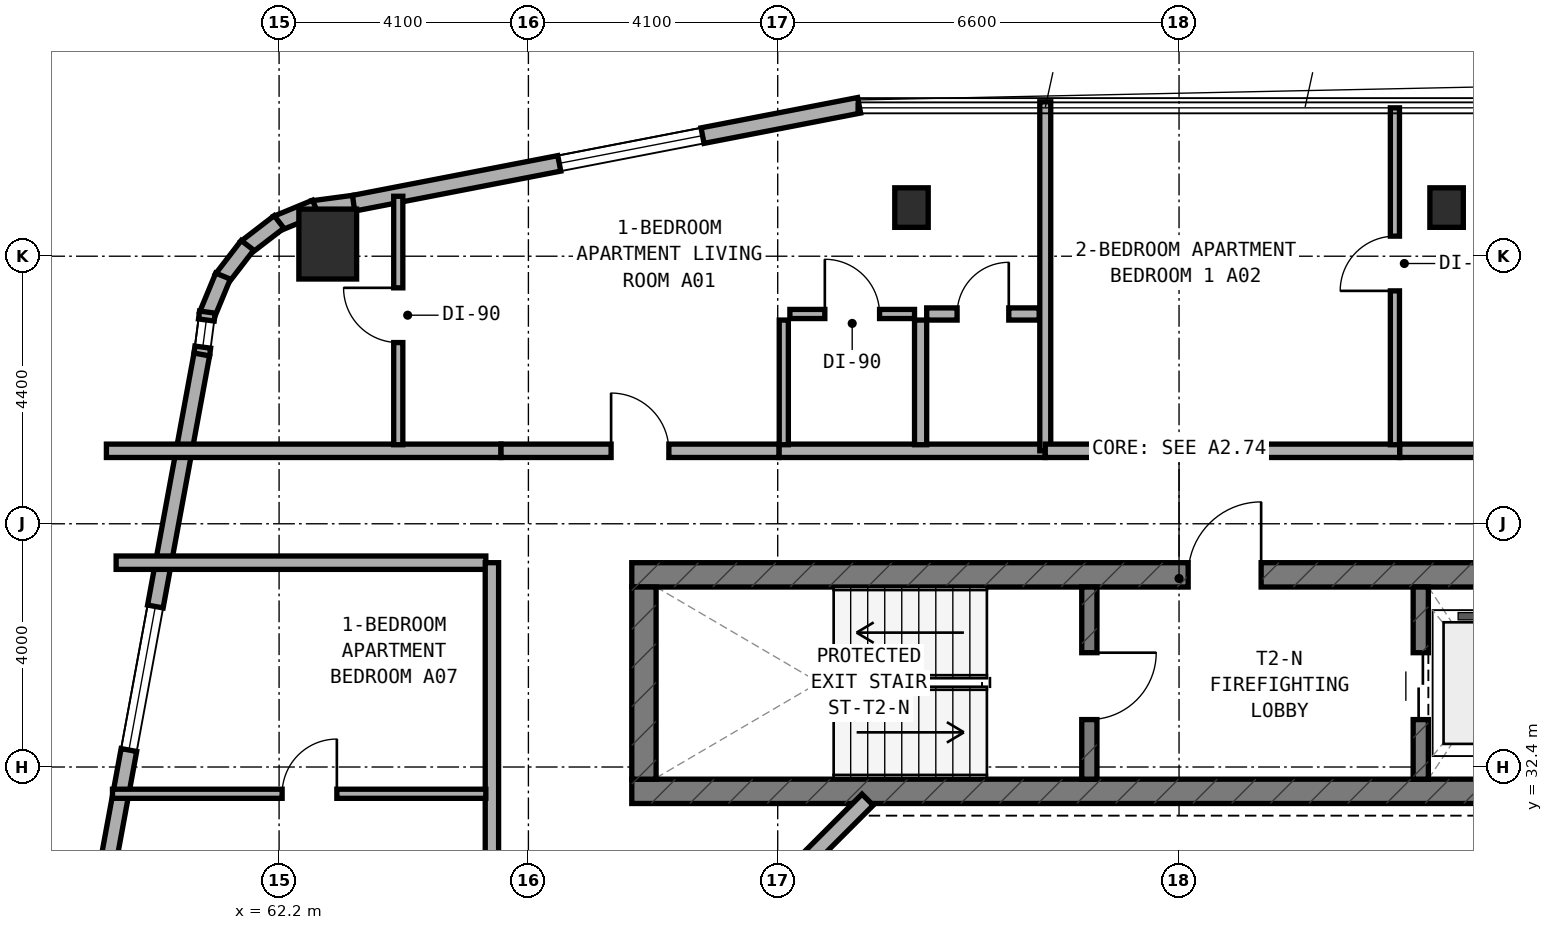
"""IFC4 building model, lengths in metres.
Left out: names, types, materials, properties, quantities, classifications, styles, units other than length and angle.
Written with IfcOpenShell. Run it as: python <this file> out.ifc"""

import sys

from ifc_helpers import new_model, si_unit, direction, frame, frame_2d, origin, origin_2d, place, context, subcontext, project, spatial, rectangle, extrude, element, fill, save


model = new_model("IFC4")
c1 = context("Model", 3, precision=1e-05, world=origin(), true_north=direction((0.0, 1.0)))
c2 = subcontext(c1, "Body", "Model", "MODEL_VIEW")
j1 = project(units=[si_unit("LENGTHUNIT", "METRE"), si_unit("PLANEANGLEUNIT", "RADIAN")], contexts=[c1])
p1 = place(None, origin())
s1 = spatial("IfcSite", under=j1, at=p1, CompositionType="ELEMENT")
p2 = place(p1, origin())
s2 = spatial("IfcBuilding", under=s1, at=p2, CompositionType="ELEMENT")
p3 = place(p2, frame((0.0, 0.0, 109.0)))
s3 = spatial("IfcBuildingStorey", under=s2, at=p3, CompositionType="ELEMENT", Elevation=109.0)
p4 = place(p3, frame((68.0, 32.0, 0.0), z_axis=(0.0, 0.0, 1.0), x_axis=(1.0, 0.0, 0.0)))
e1 = element("IfcWall", 1, at=p4, inside=s3, PredefinedType="SHEAR", context=c2, shape_type="SweptSolid", body=[
    extrude(rectangle(XDim=18.2, YDim=0.4, at=frame_2d((9.1, 0.0))), origin(), (0.0, 0.0, 1.0), 3.5),
])
p5 = place(p3, frame((68.0, 35.56, 0.0), z_axis=(0.0, 0.0, 1.0), x_axis=(1.0, 0.0, 0.0)))
e2 = element("IfcWall", 2, at=p5, inside=s3, PredefinedType="SHEAR", context=c2, shape_type="SweptSolid", body=[
    extrude(rectangle(XDim=18.2, YDim=0.4, at=frame_2d((9.1, 0.0))), origin(), (0.0, 0.0, 1.0), 3.5),
])
p6 = place(p5, frame((9.15, 0.0, 0.0)))
e3 = element("IfcOpeningElement", 3, at=p6, cuts=e2, PredefinedType="OPENING", context=c2, shape_type="SweptSolid", body=[
    extrude(rectangle(XDim=1.2, YDim=2.15, at=frame_2d((0.6, 1.075))), frame((0.0, 0.21, 0.0), z_axis=(0.0, -1.0, 0.0), x_axis=(1.0, 0.0, 0.0)), (0.0, 0.0, 1.0), 0.42),
])
p7 = place(p5, frame((16.75, 0.0, 0.0)))
e4 = element("IfcOpeningElement", 4, at=p7, cuts=e2, PredefinedType="OPENING", context=c2, shape_type="SweptSolid", body=[
    extrude(rectangle(XDim=0.85, YDim=2.1, at=frame_2d((0.425, 1.05))), frame((0.0, 0.21, 0.0), z_axis=(0.0, -1.0, 0.0), x_axis=(1.0, 0.0, 0.0)), (0.0, 0.0, 1.0), 0.42),
])
p8 = place(p3, frame((68.2, 32.2, 0.0), z_axis=(0.0, 0.0, 1.0), x_axis=(0.0, 1.0, 0.0)))
e5 = element("IfcWall", 5, at=p8, inside=s3, PredefinedType="SHEAR", context=c2, shape_type="SweptSolid", body=[
    extrude(rectangle(XDim=3.16, YDim=0.4, at=frame_2d((1.58, 0.0))), origin(), (0.0, 0.0, 1.0), 3.5),
])
p9 = place(p3, frame((75.525, 32.2, 0.0), z_axis=(0.0, 0.0, 1.0), x_axis=(0.0, 1.0, 0.0)))
e6 = element("IfcWall", 6, at=p9, inside=s3, PredefinedType="STANDARD", context=c2, shape_type="SweptSolid", body=[
    extrude(rectangle(XDim=3.16, YDim=0.25, at=frame_2d((1.58, 0.0))), origin(), (0.0, 0.0, 1.0), 3.25),
])
p10 = place(p9, frame((0.98, 0.0, 0.0)))
e7 = element("IfcOpeningElement", 7, at=p10, cuts=e6, PredefinedType="OPENING", context=c2, shape_type="SweptSolid", body=[
    extrude(rectangle(XDim=1.1, YDim=2.15, at=frame_2d((0.55, 1.075))), frame((0.0, 0.135, 0.0), z_axis=(0.0, -1.0, 0.0), x_axis=(1.0, 0.0, 0.0)), (0.0, 0.0, 1.0), 0.27),
])
p11 = place(p3, frame((80.975, 32.2, 0.0), z_axis=(0.0, 0.0, 1.0), x_axis=(0.0, 1.0, 0.0)))
e8 = element("IfcWall", 8, at=p11, inside=s3, PredefinedType="STANDARD", context=c2, shape_type="SweptSolid", body=[
    extrude(rectangle(XDim=3.16, YDim=0.25, at=frame_2d((1.58, 0.0))), origin(), (0.0, 0.0, 1.0), 3.25),
])
p12 = place(p11, frame((0.98, 0.0, 0.0)))
e9 = element("IfcOpeningElement", 9, at=p12, cuts=e8, PredefinedType="OPENING", context=c2, shape_type="SweptSolid", body=[
    extrude(rectangle(XDim=1.1, YDim=2.15, at=frame_2d((0.55, 1.075))), frame((0.0, 0.135, 0.0), z_axis=(0.0, -1.0, 0.0), x_axis=(1.0, 0.0, 0.0)), (0.0, 0.0, 1.0), 0.27),
])
for number, where, z_axis, x_axis in (
    (10, (72.6, 41.6, 0.0), (0.0, 0.0, 1.0), (1.0, 0.0, 0.0)),
    (11, (81.4, 41.6, 0.0), (0.0, 0.0, 1.0), (1.0, 0.0, 0.0)),
):
    element("IfcColumn", number, at=place(p3, frame(where, z_axis=z_axis, x_axis=x_axis)), inside=s3, PredefinedType="COLUMN", context=c2, shape_type="SweptSolid", body=[
        extrude(rectangle(XDim=0.55, YDim=0.65, at=origin_2d()), origin(), (0.0, 0.0, 1.0), 3.5),
    ])
p13 = place(p3, frame((63.0, 41.0, 0.0), z_axis=(0.0, 0.0, 1.0), x_axis=(1.0, 0.0, 0.0)))
e12 = element("IfcColumn", 12, at=p13, inside=s3, PredefinedType="COLUMN", context=c2, shape_type="SweptSolid", body=[
    extrude(rectangle(XDim=0.95, YDim=1.15, at=origin_2d()), origin(), (0.0, 0.0, 1.0), 3.5),
])
p14 = place(p3, frame((71.739, 43.282, 0.0), z_axis=(0.0, 0.0, 1.0), x_axis=(-0.981750199588, -0.190175039396, 0.0)))
e13 = element("IfcWall", 13, at=p14, inside=s3, PredefinedType="STANDARD", context=c2, shape_type="SweptSolid", body=[
    extrude(rectangle(XDim=8.477, YDim=0.26, at=frame_2d((4.238, 0.0))), origin(), (0.0, 0.0, 1.0), 3.25),
])
p15 = place(p14, frame((2.623, 0.0, 0.8)))
e14 = element("IfcOpeningElement", 14, at=p15, cuts=e13, PredefinedType="OPENING", context=c2, shape_type="SweptSolid", body=[
    extrude(rectangle(XDim=2.4, YDim=1.6, at=frame_2d((1.2, 0.8))), frame((0.0, 0.14, 0.0), z_axis=(0.0, -1.0, 0.0), x_axis=(1.0, 0.0, 0.0)), (0.0, 0.0, 1.0), 0.28),
])
p16 = place(p3, frame((63.425, 41.672, 0.0), z_axis=(0.0, 0.0, 1.0), x_axis=(-0.991300187529, -0.13162043232, 0.0)))
e15 = element("IfcWall", 15, at=p16, inside=s3, PredefinedType="STANDARD", context=c2, shape_type="SweptSolid", body=[
    extrude(rectangle(XDim=0.677, YDim=0.26, at=frame_2d((0.338, 0.0))), origin(), (0.0, 0.0, 1.0), 3.25),
])
for number, where, z_axis, x_axis in (
    (16, (62.8, 41.601, 0.0), (0.0, 0.0, 1.0), (-0.924, -0.382, 0.0)),
    (17, (62.199, 41.364, 0.0), (0.0, 0.0, 1.0), (-0.793, -0.61, 0.0)),
    (18, (61.68, 40.979, 0.0), (0.0, 0.0, 1.0), (-0.609, -0.793, 0.0)),
):
    element("IfcWall", number, at=place(p3, frame(where, z_axis=z_axis, x_axis=x_axis)), inside=s3, PredefinedType="STANDARD", context=c2, shape_type="SweptSolid", body=[
        extrude(rectangle(XDim=0.694, YDim=0.26, at=frame_2d((0.347, 0.0))), origin(), (0.0, 0.0, 1.0), 3.25),
    ])
p17 = place(p3, frame((61.278, 40.473, 0.0), z_axis=(0.0, 0.0, 1.0), x_axis=(-0.382289608286, -0.924042561464, 0.0)))
e19 = element("IfcWall", 19, at=p17, inside=s3, PredefinedType="STANDARD", context=c2, shape_type="SweptSolid", body=[
    extrude(rectangle(XDim=0.694, YDim=0.26, at=frame_2d((0.347, 0.0))), origin(), (0.0, 0.0, 1.0), 3.25),
])
p18 = place(p3, frame((61.021, 39.881, 0.0), z_axis=(0.0, 0.0, 1.0), x_axis=(-0.130614135366, -0.991433279471, 0.0)))
e20 = element("IfcWall", 20, at=p18, inside=s3, PredefinedType="STANDARD", context=c2, shape_type="SweptSolid", body=[
    extrude(rectangle(XDim=0.712, YDim=0.26, at=frame_2d((0.356, 0.0))), origin(), (0.0, 0.0, 1.0), 3.25),
])
p19 = place(p18, frame((0.131, 0.0, 0.85)))
e21 = element("IfcOpeningElement", 21, at=p19, cuts=e20, PredefinedType="OPENING", context=c2, shape_type="SweptSolid", body=[
    extrude(rectangle(XDim=0.45, YDim=1.5, at=frame_2d((0.225, 0.75))), frame((0.0, 0.14, 0.0), z_axis=(0.0, -1.0, 0.0), x_axis=(1.0, 0.0, 0.0)), (0.0, 0.0, 1.0), 0.28),
])
p20 = place(p3, frame((60.929, 39.184, 0.0), z_axis=(0.0, 0.0, 1.0), x_axis=(-0.181209963057, -0.983444431215, 0.0)))
e22 = element("IfcWall", 22, at=p20, inside=s3, PredefinedType="STANDARD", context=c2, shape_type="SweptSolid", body=[
    extrude(rectangle(XDim=8.889, YDim=0.26, at=frame_2d((4.445, 0.0))), origin(), (0.0, 0.0, 1.0), 3.25),
])
p21 = place(p20, frame((4.214, 0.0, 0.8)))
e23 = element("IfcOpeningElement", 23, at=p21, cuts=e22, PredefinedType="OPENING", context=c2, shape_type="SweptSolid", body=[
    extrude(rectangle(XDim=2.4, YDim=1.6, at=frame_2d((1.2, 0.8))), frame((0.0, 0.14, 0.0), z_axis=(0.0, -1.0, 0.0), x_axis=(1.0, 0.0, 0.0)), (0.0, 0.0, 1.0), 0.28),
])
p22 = place(p3, frame((71.878, 31.862, 0.0), z_axis=(0.0, 0.0, 1.0), x_axis=(-0.707106781187, -0.707106781187, 0.0)))
e24 = element("IfcWall", 24, at=p22, inside=s3, PredefinedType="STANDARD", context=c2, shape_type="SweptSolid", body=[
    extrude(rectangle(XDim=2.311, YDim=0.26, at=frame_2d((1.155, 0.0))), origin(), (0.0, 0.0, 1.0), 3.25),
])
p23 = place(p3, frame((59.36, 37.6, 0.0), z_axis=(0.0, 0.0, 1.0), x_axis=(1.0, 0.0, 0.0)))
e25 = element("IfcWall", 25, at=p23, inside=s3, PredefinedType="SOLIDWALL", context=c2, shape_type="SweptSolid", body=[
    extrude(rectangle(XDim=6.49, YDim=0.22, at=frame_2d((3.245, 0.0))), origin(), (0.0, 0.0, 1.0), 2.945),
])
p24 = place(p3, frame((70.42, 37.6, 0.0), z_axis=(0.0, 0.0, 1.0), x_axis=(1.0, 0.0, 0.0)))
e26 = element("IfcWall", 26, at=p24, inside=s3, PredefinedType="SOLIDWALL", context=c2, shape_type="SweptSolid", body=[
    extrude(rectangle(XDim=4.38, YDim=0.22, at=frame_2d((2.19, 0.0))), origin(), (0.0, 0.0, 1.0), 2.825),
])
p25 = place(p3, frame((65.85, 37.6, 0.0), z_axis=(0.0, 0.0, 1.0), x_axis=(1.0, 0.0, 0.0)))
e27 = element("IfcWall", 27, at=p25, inside=s3, PredefinedType="SOLIDWALL", context=c2, shape_type="SweptSolid", body=[
    extrude(rectangle(XDim=4.57, YDim=0.22, at=frame_2d((2.285, 0.0))), origin(), (0.0, 0.0, 1.0), 3.22),
])
p26 = place(p25, frame((1.81, 0.0, 0.0)))
e28 = element("IfcOpeningElement", 28, at=p26, cuts=e27, PredefinedType="OPENING", context=c2, shape_type="SweptSolid", body=[
    extrude(rectangle(XDim=0.95, YDim=2.1, at=frame_2d((0.475, 1.05))), frame((0.0, 0.12, 0.0), z_axis=(0.0, -1.0, 0.0), x_axis=(1.0, 0.0, 0.0)), (0.0, 0.0, 1.0), 0.24),
])
p27 = place(p3, frame((64.16, 37.7, 0.0), z_axis=(0.0, 0.0, 1.0), x_axis=(0.0, 1.0, 0.0)))
e29 = element("IfcWall", 29, at=p27, inside=s3, PredefinedType="PARTITIONING", context=c2, shape_type="SweptSolid", body=[
    extrude(rectangle(XDim=4.086, YDim=0.15, at=frame_2d((2.043, 0.0))), origin(), (0.0, 0.0, 1.0), 2.945),
])
p28 = place(p27, frame((1.68, 0.0, 0.0)))
e30 = element("IfcOpeningElement", 30, at=p28, cuts=e29, PredefinedType="OPENING", context=c2, shape_type="SweptSolid", body=[
    extrude(rectangle(XDim=0.9, YDim=2.1, at=frame_2d((0.45, 1.05))), frame((0.0, 0.085, 0.0), z_axis=(0.0, -1.0, 0.0), x_axis=(1.0, 0.0, 0.0)), (0.0, 0.0, 1.0), 0.17),
])
p29 = place(p3, frame((72.75, 37.7, 0.0), z_axis=(0.0, 0.0, 1.0), x_axis=(0.0, 1.0, 0.0)))
e31 = element("IfcWall", 31, at=p29, inside=s3, PredefinedType="PLUMBINGWALL", context=c2, shape_type="SweptSolid", body=[
    extrude(rectangle(XDim=2.05, YDim=0.2, at=frame_2d((1.025, 0.0))), origin(), (0.0, 0.0, 1.0), 2.825),
])
p30 = place(p3, frame((70.5, 37.7, 0.0), z_axis=(0.0, 0.0, 1.0), x_axis=(0.0, 1.0, 0.0)))
e32 = element("IfcWall", 32, at=p30, inside=s3, PredefinedType="PARTITIONING", context=c2, shape_type="SweptSolid", body=[
    extrude(rectangle(XDim=2.05, YDim=0.15, at=frame_2d((1.025, 0.0))), origin(), (0.0, 0.0, 1.0), 3.22),
])
p31 = place(p3, frame((72.85, 39.85, 0.0), z_axis=(0.0, 0.0, 1.0), x_axis=(1.0, 0.0, 0.0)))
e33 = element("IfcWall", 33, at=p31, inside=s3, PredefinedType="PLUMBINGWALL", context=c2, shape_type="SweptSolid", body=[
    extrude(rectangle(XDim=1.85, YDim=0.2, at=frame_2d((0.925, 0.0))), origin(), (0.0, 0.0, 1.0), 3.22),
])
p32 = place(p31, frame((0.5, 0.0, 0.0)))
e34 = element("IfcOpeningElement", 34, at=p32, cuts=e33, PredefinedType="OPENING", context=c2, shape_type="SweptSolid", body=[
    extrude(rectangle(XDim=0.85, YDim=2.1, at=frame_2d((0.425, 1.05))), frame((0.0, 0.11, 0.0), z_axis=(0.0, -1.0, 0.0), x_axis=(1.0, 0.0, 0.0)), (0.0, 0.0, 1.0), 0.22),
])
p33 = place(p3, frame((70.6, 39.85, 0.0), z_axis=(0.0, 0.0, 1.0), x_axis=(1.0, 0.0, 0.0)))
e35 = element("IfcWall", 35, at=p33, inside=s3, PredefinedType="PARTITIONING", context=c2, shape_type="SweptSolid", body=[
    extrude(rectangle(XDim=2.05, YDim=0.15, at=frame_2d((1.025, 0.0))), origin(), (0.0, 0.0, 1.0), 2.825),
])
p34 = place(p33, frame((0.575, 0.0, 0.0)))
e36 = element("IfcOpeningElement", 36, at=p34, cuts=e35, PredefinedType="OPENING", context=c2, shape_type="SweptSolid", body=[
    extrude(rectangle(XDim=0.9, YDim=2.1, at=frame_2d((0.45, 1.05))), frame((0.0, 0.085, 0.0), z_axis=(0.0, -1.0, 0.0), x_axis=(1.0, 0.0, 0.0)), (0.0, 0.0, 1.0), 0.17),
])
p35 = place(p3, frame((74.8, 37.6, 0.0), z_axis=(0.0, 0.0, 1.0), x_axis=(0.0, 1.0, 0.0)))
e37 = element("IfcWall", 37, at=p35, inside=s3, PredefinedType="SOLIDWALL", context=c2, shape_type="SweptSolid", body=[
    extrude(rectangle(XDim=5.74, YDim=0.18, at=frame_2d((2.87, 0.0))), origin(), (0.0, 0.0, 1.0), 2.865),
])
p36 = place(p3, frame((74.8, 37.6, 0.0), z_axis=(0.0, 0.0, 1.0), x_axis=(1.0, 0.0, 0.0)))
e38 = element("IfcWall", 38, at=p36, inside=s3, PredefinedType="SOLIDWALL", context=c2, shape_type="SweptSolid", body=[
    extrude(rectangle(XDim=5.83, YDim=0.22, at=frame_2d((2.915, 0.0))), origin(), (0.0, 0.0, 1.0), 3.22),
])
p37 = place(p3, frame((80.63, 37.6, 0.0), z_axis=(0.0, 0.0, 1.0), x_axis=(1.0, 0.0, 0.0)))
e39 = element("IfcWall", 39, at=p37, inside=s3, PredefinedType="SOLIDWALL", context=c2, shape_type="SweptSolid", body=[
    extrude(rectangle(XDim=3.88, YDim=0.22, at=frame_2d((1.94, 0.0))), origin(), (0.0, 0.0, 1.0), 2.825),
])
p38 = place(p37, frame((1.465, 0.0, 0.0)))
e40 = element("IfcOpeningElement", 40, at=p38, cuts=e39, PredefinedType="OPENING", context=c2, shape_type="SweptSolid", body=[
    extrude(rectangle(XDim=0.95, YDim=2.1, at=frame_2d((0.475, 1.05))), frame((0.0, 0.12, 0.0), z_axis=(0.0, -1.0, 0.0), x_axis=(1.0, 0.0, 0.0)), (0.0, 0.0, 1.0), 0.24),
])
p39 = place(p3, frame((80.55, 37.7, 0.0), z_axis=(0.0, 0.0, 1.0), x_axis=(0.0, 1.0, 0.0)))
e41 = element("IfcWall", 41, at=p39, inside=s3, PredefinedType="PARTITIONING", context=c2, shape_type="SweptSolid", body=[
    extrude(rectangle(XDim=5.54, YDim=0.15, at=frame_2d((2.77, 0.0))), origin(), (0.0, 0.0, 1.0), 2.865),
])
p40 = place(p39, frame((2.53, 0.0, 0.0)))
e42 = element("IfcOpeningElement", 42, at=p40, cuts=e41, PredefinedType="OPENING", context=c2, shape_type="SweptSolid", body=[
    extrude(rectangle(XDim=0.9, YDim=2.1, at=frame_2d((0.45, 1.05))), frame((0.0, 0.085, 0.0), z_axis=(0.0, -1.0, 0.0), x_axis=(1.0, 0.0, 0.0)), (0.0, 0.0, 1.0), 0.17),
])
p41 = place(p3, frame((59.52, 35.76, 0.0), z_axis=(0.0, 0.0, 1.0), x_axis=(1.0, 0.0, 0.0)))
e43 = element("IfcWall", 43, at=p41, inside=s3, PredefinedType="SOLIDWALL", context=c2, shape_type="SweptSolid", body=[
    extrude(rectangle(XDim=6.08, YDim=0.22, at=frame_2d((3.04, 0.0))), origin(), (0.0, 0.0, 1.0), 2.945),
])
p42 = place(p3, frame((65.7, 27.9, 0.0), z_axis=(0.0, 0.0, 1.0), x_axis=(0.0, 1.0, 0.0)))
e44 = element("IfcWall", 44, at=p42, inside=s3, PredefinedType="SOLIDWALL", context=c2, shape_type="SweptSolid", body=[
    extrude(rectangle(XDim=7.86, YDim=0.22, at=frame_2d((3.93, 0.0))), origin(), (0.0, 0.0, 1.0), 2.825),
])
p43 = place(p42, frame((1.555, 0.0, 0.0)))
e45 = element("IfcOpeningElement", 45, at=p43, cuts=e44, PredefinedType="OPENING", context=c2, shape_type="SweptSolid", body=[
    extrude(rectangle(XDim=0.95, YDim=2.1, at=frame_2d((0.475, 1.05))), frame((0.0, 0.12, 0.0), z_axis=(0.0, -1.0, 0.0), x_axis=(1.0, 0.0, 0.0)), (0.0, 0.0, 1.0), 0.24),
])
p44 = place(p3, frame((59.46, 31.96, 0.0), z_axis=(0.0, 0.0, 1.0), x_axis=(1.0, 0.0, 0.0)))
e46 = element("IfcWall", 46, at=p44, inside=s3, PredefinedType="PARTITIONING", context=c2, shape_type="SweptSolid", body=[
    extrude(rectangle(XDim=6.14, YDim=0.15, at=frame_2d((3.07, 0.0))), origin(), (0.0, 0.0, 1.0), 2.945),
])
p45 = place(p44, frame((2.79, 0.0, 0.0)))
e47 = element("IfcOpeningElement", 47, at=p45, cuts=e46, PredefinedType="OPENING", context=c2, shape_type="SweptSolid", body=[
    extrude(rectangle(XDim=0.9, YDim=2.1, at=frame_2d((0.45, 1.05))), frame((0.0, 0.085, 0.0), z_axis=(0.0, -1.0, 0.0), x_axis=(1.0, 0.0, 0.0)), (0.0, 0.0, 1.0), 0.17),
])
p46 = place(p15, origin())
e48 = element("IfcWindow", 48, at=p46, inside=s3, PartitioningType="SINGLE_PANEL", PredefinedType="WINDOW", context=c2, shape_type="SweptSolid", body=[
    extrude(rectangle(XDim=2.4, YDim=1.6, at=frame_2d((1.2, 0.8))), frame((0.0, 0.03, 0.0), z_axis=(0.0, -1.0, 0.0), x_axis=(1.0, 0.0, 0.0)), (0.0, 0.0, 1.0), 0.06),
])
fill(e14, e48)
p47 = place(p21, origin())
e49 = element("IfcWindow", 49, at=p47, inside=s3, PartitioningType="SINGLE_PANEL", PredefinedType="WINDOW", context=c2, shape_type="SweptSolid", body=[
    extrude(rectangle(XDim=2.4, YDim=1.6, at=frame_2d((1.2, 0.8))), frame((0.0, 0.03, 0.0), z_axis=(0.0, -1.0, 0.0), x_axis=(1.0, 0.0, 0.0)), (0.0, 0.0, 1.0), 0.06),
])
fill(e23, e49)
p48 = place(p19, origin())
e50 = element("IfcWindow", 50, at=p48, inside=s3, PartitioningType="SINGLE_PANEL", PredefinedType="WINDOW", context=c2, shape_type="SweptSolid", body=[
    extrude(rectangle(XDim=0.45, YDim=1.5, at=frame_2d((0.225, 0.75))), frame((0.0, 0.03, 0.0), z_axis=(0.0, -1.0, 0.0), x_axis=(1.0, 0.0, 0.0)), (0.0, 0.0, 1.0), 0.06),
])
fill(e21, e50)
p49 = place(p10, frame((1.1, 0.0, 0.0), z_axis=(0.0, 0.0, 1.0), x_axis=(-1.0, 0.0, 0.0)))
e51 = element("IfcDoor", 51, at=p49, inside=s3, OperationType="SINGLE_SWING_LEFT", PredefinedType="DOOR", context=c2, shape_type="SweptSolid", body=[
    extrude(rectangle(XDim=1.1, YDim=2.15, at=frame_2d((0.55, 1.075))), frame((0.0, 0.025, 0.0), z_axis=(0.0, -1.0, 0.0), x_axis=(1.0, 0.0, 0.0)), (0.0, 0.0, 1.0), 0.05),
])
fill(e7, e51)
p50 = place(p6, origin())
e52 = element("IfcDoor", 52, at=p50, inside=s3, OperationType="SINGLE_SWING_RIGHT", PredefinedType="DOOR", context=c2, shape_type="SweptSolid", body=[
    extrude(rectangle(XDim=1.2, YDim=2.15, at=frame_2d((0.6, 1.075))), frame((0.0, 0.025, 0.0), z_axis=(0.0, -1.0, 0.0), x_axis=(1.0, 0.0, 0.0)), (0.0, 0.0, 1.0), 0.05),
])
fill(e3, e52)
p51 = place(p12, origin())
e53 = element("IfcDoor", 53, at=p51, inside=s3, OperationType="DOUBLE_DOOR_SLIDING", PredefinedType="DOOR", context=c2, shape_type="SweptSolid", body=[
    extrude(rectangle(XDim=1.1, YDim=2.15, at=frame_2d((0.55, 1.075))), frame((0.0, 0.025, 0.0), z_axis=(0.0, -1.0, 0.0), x_axis=(1.0, 0.0, 0.0)), (0.0, 0.0, 1.0), 0.05),
])
fill(e9, e53)
p52 = place(p26, origin())
e54 = element("IfcDoor", 54, at=p52, inside=s3, OperationType="SINGLE_SWING_LEFT", PredefinedType="DOOR", context=c2, shape_type="SweptSolid", body=[
    extrude(rectangle(XDim=0.95, YDim=2.1, at=frame_2d((0.475, 1.05))), frame((0.0, 0.025, 0.0), z_axis=(0.0, -1.0, 0.0), x_axis=(1.0, 0.0, 0.0)), (0.0, 0.0, 1.0), 0.05),
])
fill(e28, e54)
p53 = place(p28, origin())
e55 = element("IfcDoor", 55, at=p53, inside=s3, OperationType="SINGLE_SWING_RIGHT", PredefinedType="DOOR", context=c2, shape_type="SweptSolid", body=[
    extrude(rectangle(XDim=0.9, YDim=2.1, at=frame_2d((0.45, 1.05))), frame((0.0, 0.025, 0.0), z_axis=(0.0, -1.0, 0.0), x_axis=(1.0, 0.0, 0.0)), (0.0, 0.0, 1.0), 0.05),
])
fill(e30, e55)
p54 = place(p32, origin())
e56 = element("IfcDoor", 56, at=p54, inside=s3, OperationType="SINGLE_SWING_RIGHT", PredefinedType="DOOR", context=c2, shape_type="SweptSolid", body=[
    extrude(rectangle(XDim=0.85, YDim=2.1, at=frame_2d((0.425, 1.05))), frame((0.0, 0.025, 0.0), z_axis=(0.0, -1.0, 0.0), x_axis=(1.0, 0.0, 0.0)), (0.0, 0.0, 1.0), 0.05),
])
fill(e34, e56)
p55 = place(p34, origin())
e57 = element("IfcDoor", 57, at=p55, inside=s3, OperationType="SINGLE_SWING_LEFT", PredefinedType="DOOR", context=c2, shape_type="SweptSolid", body=[
    extrude(rectangle(XDim=0.9, YDim=2.1, at=frame_2d((0.45, 1.05))), frame((0.0, 0.025, 0.0), z_axis=(0.0, -1.0, 0.0), x_axis=(1.0, 0.0, 0.0)), (0.0, 0.0, 1.0), 0.05),
])
fill(e36, e57)
p56 = place(p40, origin())
e58 = element("IfcDoor", 58, at=p56, inside=s3, OperationType="SINGLE_SWING_LEFT", PredefinedType="DOOR", context=c2, shape_type="SweptSolid", body=[
    extrude(rectangle(XDim=0.9, YDim=2.1, at=frame_2d((0.45, 1.05))), frame((0.0, 0.025, 0.0), z_axis=(0.0, -1.0, 0.0), x_axis=(1.0, 0.0, 0.0)), (0.0, 0.0, 1.0), 0.05),
])
fill(e42, e58)
p57 = place(p45, origin())
e59 = element("IfcDoor", 59, at=p57, inside=s3, OperationType="SINGLE_SWING_RIGHT", PredefinedType="DOOR", context=c2, shape_type="SweptSolid", body=[
    extrude(rectangle(XDim=0.9, YDim=2.1, at=frame_2d((0.45, 1.05))), frame((0.0, 0.025, 0.0), z_axis=(0.0, -1.0, 0.0), x_axis=(1.0, 0.0, 0.0)), (0.0, 0.0, 1.0), 0.05),
])
fill(e47, e59)
save(model, sys.argv[1])
